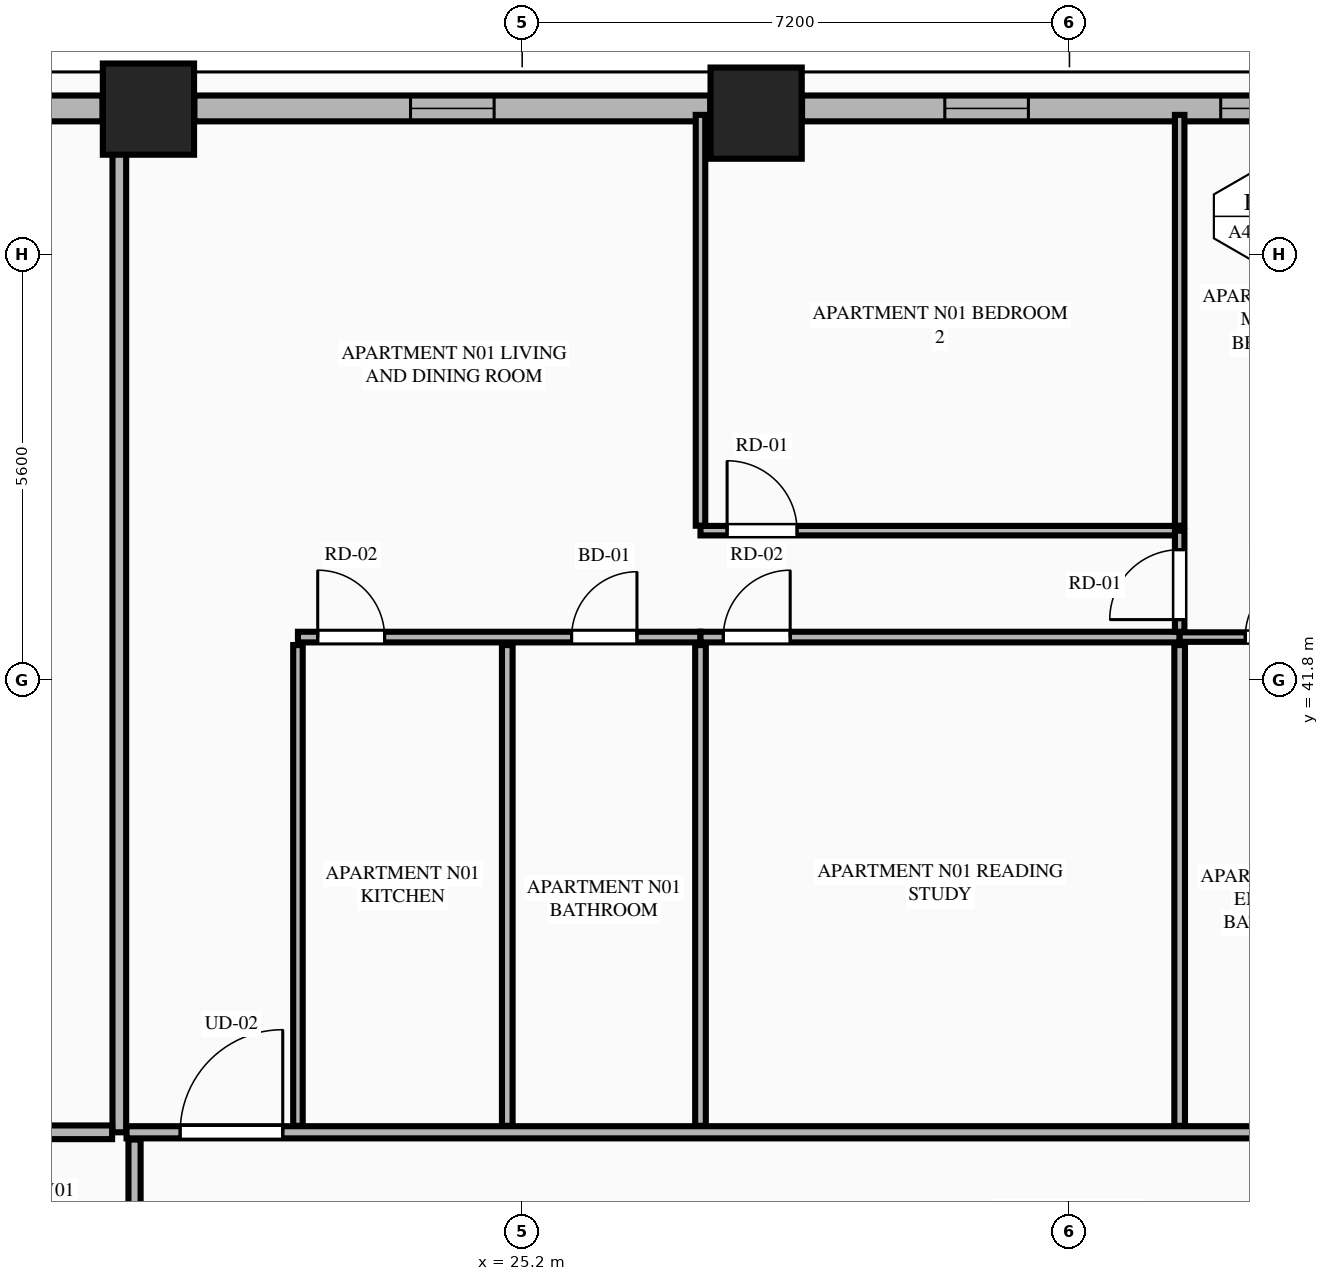
"""IFC4 building model, lengths in metres.
Left out: names, types, materials, properties, quantities, classifications, styles, units other than length and angle.
Written with IfcOpenShell. Run it as: python <this file> out.ifc"""

import sys

from ifc_helpers import new_model, si_unit, direction, frame, frame_2d, origin, origin_2d, place, context, subcontext, project, spatial, rectangle, extrude, element, fill, save


model = new_model("IFC4")
c1 = context("Model", 3, precision=1e-05, world=origin(), true_north=direction((0.0, 1.0)))
c2 = subcontext(c1, "Body", "Model", "MODEL_VIEW")
j1 = project(units=[si_unit("LENGTHUNIT", "METRE"), si_unit("PLANEANGLEUNIT", "RADIAN")], contexts=[c1])
p1 = place(None, origin())
s1 = spatial("IfcSite", under=j1, at=p1, CompositionType="ELEMENT")
p2 = place(p1, origin())
s2 = spatial("IfcBuilding", under=s1, at=p2, CompositionType="ELEMENT")
p3 = place(p2, frame((0.0, 0.0, 56.85)))
s3 = spatial("IfcBuildingStorey", under=s2, at=p3, CompositionType="ELEMENT", Elevation=56.85)
for number, where, z_axis, x_axis in (
    (1, (28.278, 49.258, 0.0), (0.0, 0.0, 1.0), (1.0, 0.0, 0.0)),
    (2, (20.283, 49.311, 0.0), (0.0, 0.0, 1.0), (1.0, 0.0, 0.0)),
):
    element("IfcColumn", number, at=place(p3, frame(where, z_axis=z_axis, x_axis=x_axis)), inside=s3, PredefinedType="COLUMN", context=c2, shape_type="SweptSolid", body=[
        extrude(rectangle(XDim=1.2, YDim=1.2, at=origin_2d()), origin(), (0.0, 0.0, 1.0), 3.55),
    ])
p4 = place(p3, frame((35.918, 49.32, 0.0), z_axis=(0.0, 0.0, 1.0), x_axis=(-1.0, 0.0, 0.0)))
e3 = element("IfcWall", 3, at=p4, inside=s3, PredefinedType="STANDARD", context=c2, shape_type="SweptSolid", body=[
    extrude(rectangle(XDim=7.036, YDim=0.34, at=frame_2d((3.518, 0.0))), origin(), (0.0, 0.0, 1.0), 2.787),
])
p5 = place(p4, frame((0.428, 0.0, 0.75)))
e4 = element("IfcOpeningElement", 4, at=p5, cuts=e3, PredefinedType="OPENING", context=c2, shape_type="SweptSolid", body=[
    extrude(rectangle(XDim=1.1, YDim=1.887, at=frame_2d((0.55, 0.943))), frame((0.0, 0.18, 0.0), z_axis=(0.0, -1.0, 0.0), x_axis=(1.0, 0.0, 0.0)), (0.0, 0.0, 1.0), 0.36),
])
p6 = place(p4, frame((4.058, 0.0, 0.75)))
e5 = element("IfcOpeningElement", 5, at=p6, cuts=e3, PredefinedType="OPENING", context=c2, shape_type="SweptSolid", body=[
    extrude(rectangle(XDim=1.1, YDim=1.887, at=frame_2d((0.55, 0.943))), frame((0.0, 0.18, 0.0), z_axis=(0.0, -1.0, 0.0), x_axis=(1.0, 0.0, 0.0)), (0.0, 0.0, 1.0), 0.36),
])
p7 = place(p3, frame((27.674, 49.32, 0.0), z_axis=(0.0, 0.0, 1.0), x_axis=(-1.0, 0.0, 0.0)))
e6 = element("IfcWall", 6, at=p7, inside=s3, PredefinedType="STANDARD", context=c2, shape_type="SweptSolid", body=[
    extrude(rectangle(XDim=6.787, YDim=0.34, at=frame_2d((3.394, 0.0))), origin(), (0.0, 0.0, 1.0), 2.787),
])
p8 = place(p7, frame((2.843, 0.0, 0.75)))
e7 = element("IfcOpeningElement", 7, at=p8, cuts=e6, PredefinedType="OPENING", context=c2, shape_type="SweptSolid", body=[
    extrude(rectangle(XDim=1.1, YDim=1.887, at=frame_2d((0.55, 0.943))), frame((0.0, 0.18, 0.0), z_axis=(0.0, -1.0, 0.0), x_axis=(1.0, 0.0, 0.0)), (0.0, 0.0, 1.0), 0.36),
])
p9 = place(p3, frame((19.679, 49.32, 0.0), z_axis=(0.0, 0.0, 1.0), x_axis=(-1.0, 0.0, 0.0)))
e8 = element("IfcWall", 8, at=p9, inside=s3, PredefinedType="STANDARD", context=c2, shape_type="SweptSolid", body=[
    extrude(rectangle(XDim=1.245, YDim=0.34, at=frame_2d((0.623, 0.0))), origin(), (0.0, 0.0, 1.0), 3.33),
])
p10 = place(p3, frame((19.9, 35.85, 0.0), z_axis=(0.0, 0.0, 1.0), x_axis=(0.0, 1.0, 0.0)))
e9 = element("IfcWall", 9, at=p10, inside=s3, PredefinedType="PARTITIONING", context=c2, shape_type="SweptSolid", body=[
    extrude(rectangle(XDim=13.295, YDim=0.18, at=frame_2d((6.647, 0.0))), origin(), (0.0, 0.0, 1.0), 3.33),
])
p11 = place(p3, frame((19.995, 35.85, 0.0), z_axis=(0.0, 0.0, 1.0), x_axis=(1.0, 0.0, 0.0)))
e10 = element("IfcWall", 10, at=p11, inside=s3, PredefinedType="PARTITIONING", context=c2, shape_type="SweptSolid", body=[
    extrude(rectangle(XDim=16.432, YDim=0.16, at=frame_2d((8.216, 0.0))), origin(), (0.0, 0.0, 1.0), 3.33),
])
p12 = place(p11, frame((0.705, 0.0, 0.0)))
e11 = element("IfcOpeningElement", 11, at=p12, cuts=e10, PredefinedType="OPENING", context=c2, shape_type="SweptSolid", body=[
    extrude(rectangle(XDim=1.35, YDim=2.35, at=frame_2d((0.675, 1.175))), frame((0.0, 0.09, 0.0), z_axis=(0.0, -1.0, 0.0), x_axis=(1.0, 0.0, 0.0)), (0.0, 0.0, 1.0), 0.18),
])
p13 = place(p3, frame((22.25, 35.935, 0.0), z_axis=(0.0, 0.0, 1.0), x_axis=(0.0, 1.0, 0.0)))
e12 = element("IfcWall", 12, at=p13, inside=s3, PredefinedType="PARTITIONING", context=c2, shape_type="SweptSolid", body=[
    extrude(rectangle(XDim=6.325, YDim=0.125, at=frame_2d((3.163, 0.0))), origin(), (0.0, 0.0, 1.0), 2.7),
])
p14 = place(p3, frame((22.25, 42.365, 0.0), z_axis=(0.0, 0.0, 1.0), x_axis=(1.0, 0.0, 0.0)))
e13 = element("IfcWall", 13, at=p14, inside=s3, PredefinedType="PLUMBINGWALL", context=c2, shape_type="SweptSolid", body=[
    extrude(rectangle(XDim=5.296, YDim=0.14, at=frame_2d((2.648, 0.0))), origin(), (0.0, 0.0, 1.0), 3.33),
])
p15 = place(p14, frame((3.6, 0.0, 0.0)))
e14 = element("IfcOpeningElement", 14, at=p15, cuts=e13, PredefinedType="OPENING", context=c2, shape_type="SweptSolid", body=[
    extrude(rectangle(XDim=0.86, YDim=2.1, at=frame_2d((0.43, 1.05))), frame((0.0, 0.08, 0.0), z_axis=(0.0, -1.0, 0.0), x_axis=(1.0, 0.0, 0.0)), (0.0, 0.0, 1.0), 0.16),
])
p16 = place(p14, frame((0.26, 0.0, 0.0)))
e15 = element("IfcOpeningElement", 15, at=p16, cuts=e13, PredefinedType="OPENING", context=c2, shape_type="SweptSolid", body=[
    extrude(rectangle(XDim=0.88, YDim=2.15, at=frame_2d((0.44, 1.075))), frame((0.0, 0.08, 0.0), z_axis=(0.0, -1.0, 0.0), x_axis=(1.0, 0.0, 0.0)), (0.0, 0.0, 1.0), 0.16),
])
p17 = place(p3, frame((27.546, 42.365, 0.0), z_axis=(0.0, 0.0, 1.0), x_axis=(1.0, 0.0, 0.0)))
e16 = element("IfcWall", 16, at=p17, inside=s3, PredefinedType="PLUMBINGWALL", context=c2, shape_type="SweptSolid", body=[
    extrude(rectangle(XDim=6.304, YDim=0.14, at=frame_2d((3.152, 0.0))), origin(), (0.0, 0.0, 1.0), 3.33),
])
p18 = place(p17, frame((0.3, 0.0, 0.0)))
e17 = element("IfcOpeningElement", 17, at=p18, cuts=e16, PredefinedType="OPENING", context=c2, shape_type="SweptSolid", body=[
    extrude(rectangle(XDim=0.88, YDim=2.15, at=frame_2d((0.44, 1.075))), frame((0.0, 0.08, 0.0), z_axis=(0.0, -1.0, 0.0), x_axis=(1.0, 0.0, 0.0)), (0.0, 0.0, 1.0), 0.16),
])
p19 = place(p3, frame((33.85, 42.365, 0.0), z_axis=(0.0, 0.0, 1.0), x_axis=(1.0, 0.0, 0.0)))
e18 = element("IfcWall", 18, at=p19, inside=s3, PredefinedType="PARTITIONING", context=c2, shape_type="SweptSolid", body=[
    extrude(rectangle(XDim=2.577, YDim=0.125, at=frame_2d((1.289, 0.0))), origin(), (0.0, 0.0, 1.0), 3.33),
])
p20 = place(p19, frame((0.863, 0.0, 0.0)))
e19 = element("IfcOpeningElement", 19, at=p20, cuts=e18, PredefinedType="OPENING", context=c2, shape_type="SweptSolid", body=[
    extrude(rectangle(XDim=0.86, YDim=2.1, at=frame_2d((0.43, 1.05))), frame((0.0, 0.073, 0.0), z_axis=(0.0, -1.0, 0.0), x_axis=(1.0, 0.0, 0.0)), (0.0, 0.0, 1.0), 0.145),
])
p21 = place(p3, frame((25.004, 35.935, 0.0), z_axis=(0.0, 0.0, 1.0), x_axis=(0.0, 1.0, 0.0)))
e20 = element("IfcWall", 20, at=p21, inside=s3, PredefinedType="PLUMBINGWALL", context=c2, shape_type="SweptSolid", body=[
    extrude(rectangle(XDim=6.325, YDim=0.14, at=frame_2d((3.163, 0.0))), origin(), (0.0, 0.0, 1.0), 3.33),
])
p22 = place(p3, frame((27.546, 43.83, 0.0), z_axis=(0.0, 0.0, 1.0), x_axis=(0.0, 1.0, 0.0)))
e21 = element("IfcWall", 21, at=p22, inside=s3, PredefinedType="PARTITIONING", context=c2, shape_type="SweptSolid", body=[
    extrude(rectangle(XDim=5.405, YDim=0.125, at=frame_2d((2.703, 0.0))), origin(), (0.0, 0.0, 1.0), 3.33),
])
p23 = place(p3, frame((27.546, 43.765, 0.0), z_axis=(0.0, 0.0, 1.0), x_axis=(1.0, 0.0, 0.0)))
e22 = element("IfcWall", 22, at=p23, inside=s3, PredefinedType="PARTITIONING", context=c2, shape_type="SweptSolid", body=[
    extrude(rectangle(XDim=6.304, YDim=0.125, at=frame_2d((3.152, 0.0))), origin(), (0.0, 0.0, 1.0), 3.33),
])
p24 = place(p23, frame((0.35, 0.0, 0.0)))
e23 = element("IfcOpeningElement", 23, at=p24, cuts=e22, PredefinedType="OPENING", context=c2, shape_type="SweptSolid", body=[
    extrude(rectangle(XDim=0.92, YDim=2.15, at=frame_2d((0.46, 1.075))), frame((0.0, 0.073, 0.0), z_axis=(0.0, -1.0, 0.0), x_axis=(1.0, 0.0, 0.0)), (0.0, 0.0, 1.0), 0.145),
])
p25 = place(p3, frame((33.85, 42.435, 0.0), z_axis=(0.0, 0.0, 1.0), x_axis=(0.0, 1.0, 0.0)))
e24 = element("IfcWall", 24, at=p25, inside=s3, PredefinedType="PARTITIONING", context=c2, shape_type="SweptSolid", body=[
    extrude(rectangle(XDim=1.33, YDim=0.125, at=frame_2d((0.665, 0.0))), origin(), (0.0, 0.0, 1.0), 3.33),
])
p26 = place(p25, frame((0.16, 0.0, 0.0)))
e25 = element("IfcOpeningElement", 25, at=p26, cuts=e24, PredefinedType="OPENING", context=c2, shape_type="SweptSolid", body=[
    extrude(rectangle(XDim=0.92, YDim=2.15, at=frame_2d((0.46, 1.075))), frame((0.0, 0.073, 0.0), z_axis=(0.0, -1.0, 0.0), x_axis=(1.0, 0.0, 0.0)), (0.0, 0.0, 1.0), 0.145),
])
for number, where, z_axis, x_axis in (
    (26, (27.546, 35.935, 0.0), (0.0, 0.0, 1.0), (0.0, 1.0, 0.0)),
    (27, (33.85, 35.935, 0.0), (0.0, 0.0, 1.0), (0.0, 1.0, 0.0)),
):
    element("IfcWall", number, at=place(p3, frame(where, z_axis=z_axis, x_axis=x_axis)), inside=s3, PredefinedType="PLUMBINGWALL", context=c2, shape_type="SweptSolid", body=[
        extrude(rectangle(XDim=6.325, YDim=0.14, at=frame_2d((3.163, 0.0))), origin(), (0.0, 0.0, 1.0), 3.33),
    ])
p27 = place(p3, frame((33.85, 43.83, 0.0), z_axis=(0.0, 0.0, 1.0), x_axis=(0.0, 1.0, 0.0)))
e28 = element("IfcWall", 28, at=p27, inside=s3, PredefinedType="PARTITIONING", context=c2, shape_type="SweptSolid", body=[
    extrude(rectangle(XDim=5.405, YDim=0.125, at=frame_2d((2.703, 0.0))), origin(), (0.0, 0.0, 1.0), 3.33),
])
p28 = place(p3, frame((10.665, 35.85, 0.0), z_axis=(0.0, 0.0, 1.0), x_axis=(1.0, 0.0, 0.0)))
e29 = element("IfcWall", 29, at=p28, inside=s3, PredefinedType="PARTITIONING", context=c2, shape_type="SweptSolid", body=[
    extrude(rectangle(XDim=9.14, YDim=0.18, at=frame_2d((4.57, 0.0))), origin(), (0.0, 0.0, 1.0), 3.33),
])
p29 = place(p3, frame((20.1, 16.045, 0.0), z_axis=(0.0, 0.0, 1.0), x_axis=(0.0, 1.0, 0.0)))
e30 = element("IfcWall", 30, at=p29, inside=s3, PredefinedType="PARTITIONING", context=c2, shape_type="SweptSolid", body=[
    extrude(rectangle(XDim=19.71, YDim=0.16, at=frame_2d((9.855, 0.0))), origin(), (0.0, 0.0, 1.0), 2.7),
])
p30 = place(p29, frame((0.45, 0.0, 0.0)))
e31 = element("IfcOpeningElement", 31, at=p30, cuts=e30, PredefinedType="OPENING", context=c2, shape_type="SweptSolid", body=[
    extrude(rectangle(XDim=1.02, YDim=2.25, at=frame_2d((0.51, 1.125))), frame((0.0, 0.09, 0.0), z_axis=(0.0, -1.0, 0.0), x_axis=(1.0, 0.0, 0.0)), (0.0, 0.0, 1.0), 0.18),
])
p31 = place(p5, origin())
e32 = element("IfcWindow", 32, at=p31, inside=s3, PartitioningType="SINGLE_PANEL", PredefinedType="WINDOW", context=c2, shape_type="SweptSolid", body=[
    extrude(rectangle(XDim=1.1, YDim=1.887, at=frame_2d((0.55, 0.943))), frame((0.0, 0.03, 0.0), z_axis=(0.0, -1.0, 0.0), x_axis=(1.0, 0.0, 0.0)), (0.0, 0.0, 1.0), 0.06),
])
fill(e4, e32)
p32 = place(p8, origin())
e33 = element("IfcWindow", 33, at=p32, inside=s3, PartitioningType="SINGLE_PANEL", PredefinedType="WINDOW", context=c2, shape_type="SweptSolid", body=[
    extrude(rectangle(XDim=1.1, YDim=1.887, at=frame_2d((0.55, 0.943))), frame((0.0, 0.03, 0.0), z_axis=(0.0, -1.0, 0.0), x_axis=(1.0, 0.0, 0.0)), (0.0, 0.0, 1.0), 0.06),
])
fill(e7, e33)
p33 = place(p15, origin())
e34 = element("IfcDoor", 34, at=p33, inside=s3, OperationType="SINGLE_SWING_RIGHT", PredefinedType="DOOR", context=c2, shape_type="SweptSolid", body=[
    extrude(rectangle(XDim=0.86, YDim=2.1, at=frame_2d((0.43, 1.05))), frame((0.0, 0.025, 0.0), z_axis=(0.0, -1.0, 0.0), x_axis=(1.0, 0.0, 0.0)), (0.0, 0.0, 1.0), 0.05),
])
fill(e14, e34)
p34 = place(p20, origin())
e35 = element("IfcDoor", 35, at=p34, inside=s3, OperationType="SINGLE_SWING_RIGHT", PredefinedType="DOOR", context=c2, shape_type="SweptSolid", body=[
    extrude(rectangle(XDim=0.86, YDim=2.1, at=frame_2d((0.43, 1.05))), frame((0.0, 0.025, 0.0), z_axis=(0.0, -1.0, 0.0), x_axis=(1.0, 0.0, 0.0)), (0.0, 0.0, 1.0), 0.05),
])
fill(e19, e35)
p35 = place(p12, origin())
e36 = element("IfcDoor", 36, at=p35, inside=s3, OperationType="SINGLE_SWING_RIGHT", PredefinedType="DOOR", context=c2, shape_type="SweptSolid", body=[
    extrude(rectangle(XDim=1.35, YDim=2.35, at=frame_2d((0.675, 1.175))), frame((0.0, 0.025, 0.0), z_axis=(0.0, -1.0, 0.0), x_axis=(1.0, 0.0, 0.0)), (0.0, 0.0, 1.0), 0.05),
])
fill(e11, e36)
p36 = place(p16, origin())
e37 = element("IfcDoor", 37, at=p36, inside=s3, OperationType="SINGLE_SWING_LEFT", PredefinedType="DOOR", context=c2, shape_type="SweptSolid", body=[
    extrude(rectangle(XDim=0.88, YDim=2.15, at=frame_2d((0.44, 1.075))), frame((0.0, 0.025, 0.0), z_axis=(0.0, -1.0, 0.0), x_axis=(1.0, 0.0, 0.0)), (0.0, 0.0, 1.0), 0.05),
])
fill(e15, e37)
p37 = place(p18, origin())
e38 = element("IfcDoor", 38, at=p37, inside=s3, OperationType="SINGLE_SWING_RIGHT", PredefinedType="DOOR", context=c2, shape_type="SweptSolid", body=[
    extrude(rectangle(XDim=0.88, YDim=2.15, at=frame_2d((0.44, 1.075))), frame((0.0, 0.025, 0.0), z_axis=(0.0, -1.0, 0.0), x_axis=(1.0, 0.0, 0.0)), (0.0, 0.0, 1.0), 0.05),
])
fill(e17, e38)
p38 = place(p24, origin())
e39 = element("IfcDoor", 39, at=p38, inside=s3, OperationType="SINGLE_SWING_LEFT", PredefinedType="DOOR", context=c2, shape_type="SweptSolid", body=[
    extrude(rectangle(XDim=0.92, YDim=2.15, at=frame_2d((0.46, 1.075))), frame((0.0, 0.025, 0.0), z_axis=(0.0, -1.0, 0.0), x_axis=(1.0, 0.0, 0.0)), (0.0, 0.0, 1.0), 0.05),
])
fill(e23, e39)
p39 = place(p26, origin())
e40 = element("IfcDoor", 40, at=p39, inside=s3, OperationType="SINGLE_SWING_LEFT", PredefinedType="DOOR", context=c2, shape_type="SweptSolid", body=[
    extrude(rectangle(XDim=0.92, YDim=2.15, at=frame_2d((0.46, 1.075))), frame((0.0, 0.025, 0.0), z_axis=(0.0, -1.0, 0.0), x_axis=(1.0, 0.0, 0.0)), (0.0, 0.0, 1.0), 0.05),
])
fill(e25, e40)
p40 = place(p6, origin())
e41 = element("IfcWindow", 41, at=p40, inside=s3, PartitioningType="SINGLE_PANEL", PredefinedType="WINDOW", context=c2, shape_type="SweptSolid", body=[
    extrude(rectangle(XDim=1.1, YDim=1.887, at=frame_2d((0.55, 0.943))), frame((0.0, 0.03, 0.0), z_axis=(0.0, -1.0, 0.0), x_axis=(1.0, 0.0, 0.0)), (0.0, 0.0, 1.0), 0.06),
])
fill(e5, e41)
save(model, sys.argv[1])
